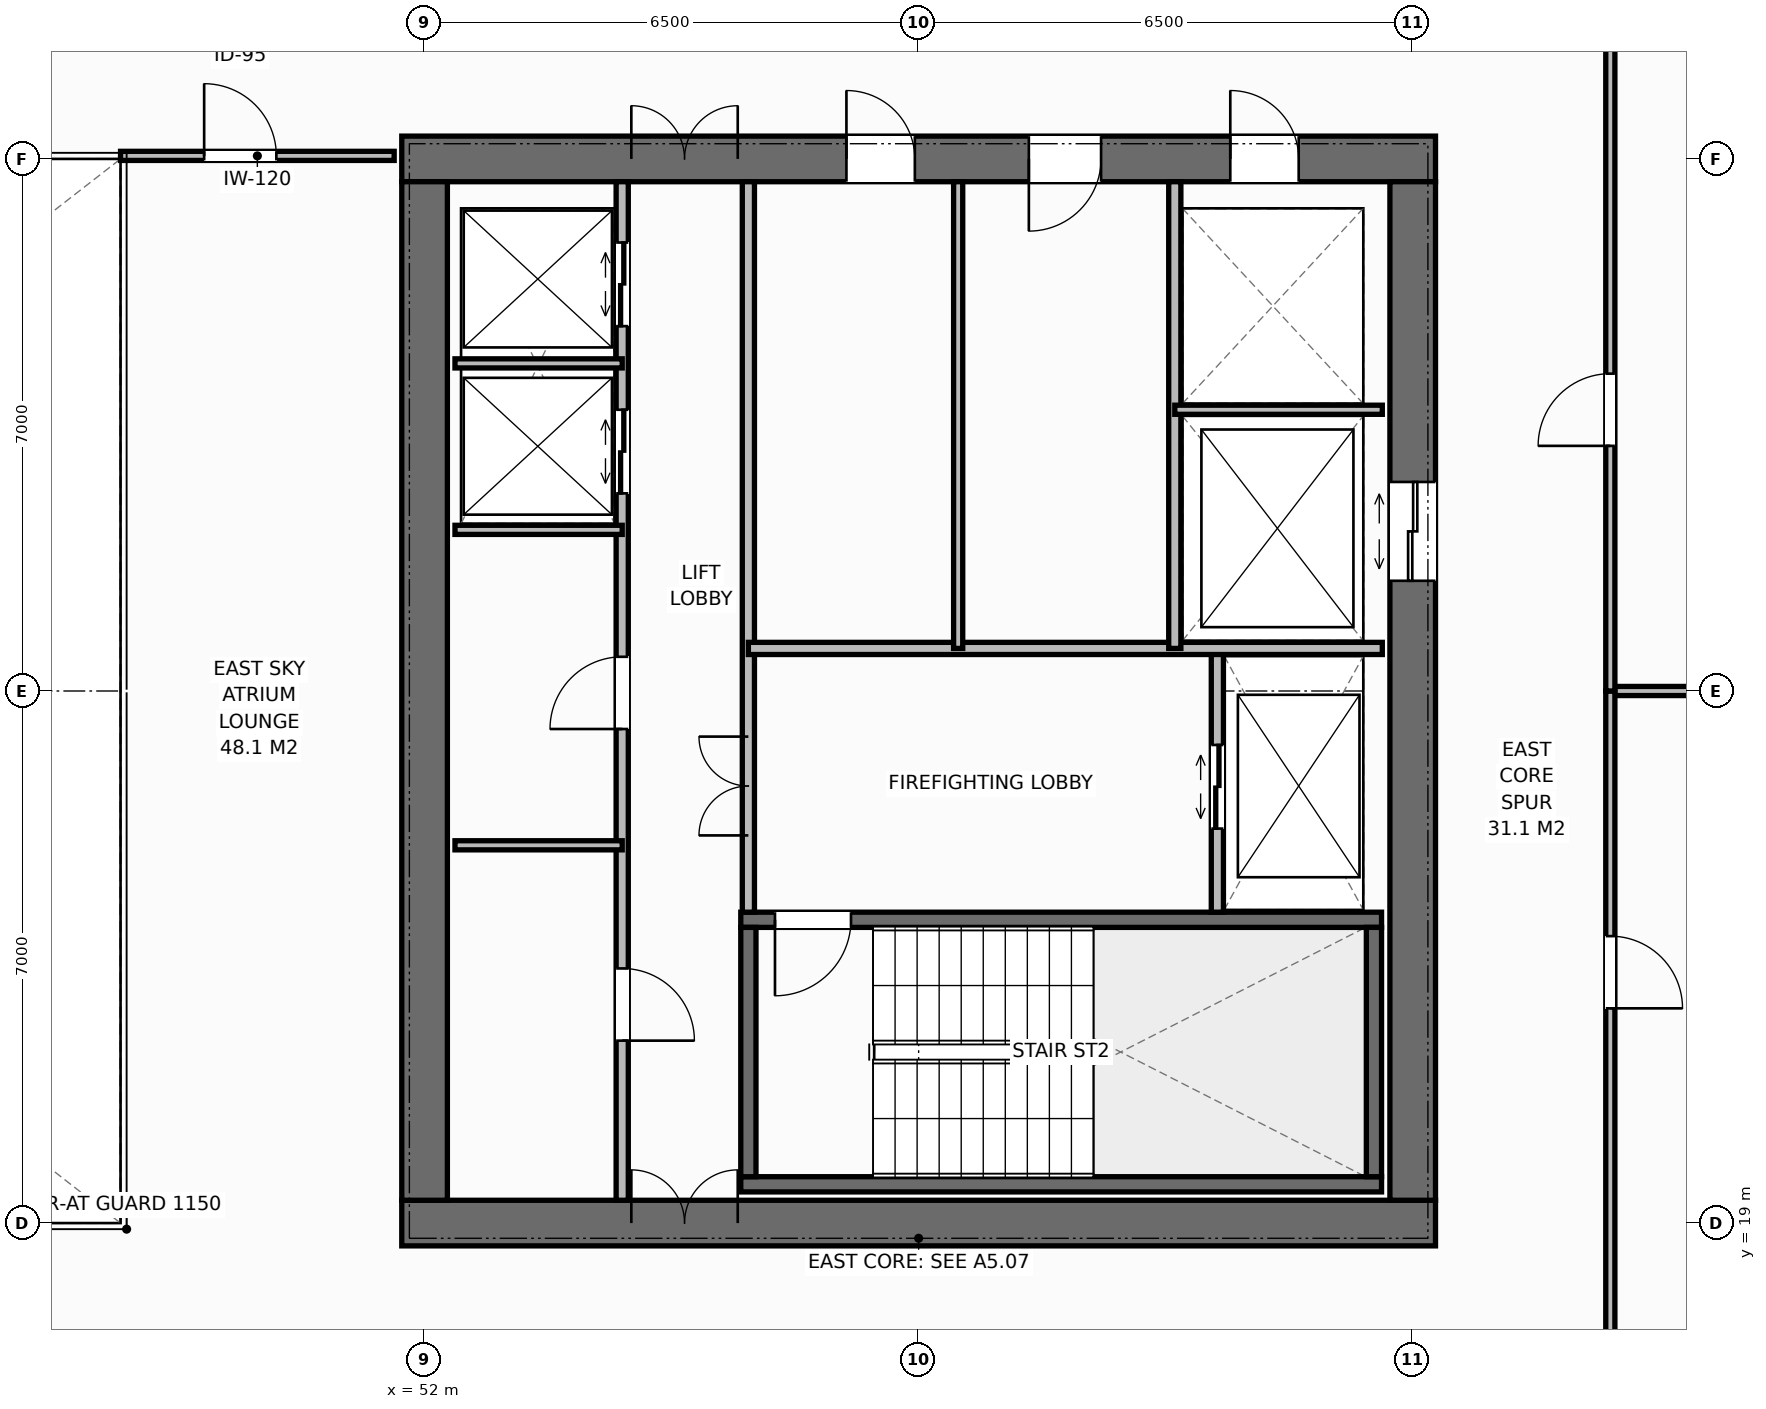
"""IFC4 building model, lengths in metres.
Left out: names, types, materials, properties, quantities, classifications, styles, units other than length and angle.
Written with IfcOpenShell. Run it as: python <this file> out.ifc"""

import sys

from ifc_helpers import new_model, si_unit, direction, frame, frame_2d, origin, place, context, subcontext, project, spatial, rectangle, extrude, element, fill, save


model = new_model("IFC4")
c1 = context("Model", 3, precision=1e-05, world=origin(), true_north=direction((0.0, 1.0)))
c2 = subcontext(c1, "Body", "Model", "MODEL_VIEW")
j1 = project(units=[si_unit("LENGTHUNIT", "METRE"), si_unit("PLANEANGLEUNIT", "RADIAN")], contexts=[c1])
p1 = place(None, origin())
s1 = spatial("IfcSite", under=j1, at=p1, CompositionType="ELEMENT")
p2 = place(p1, origin())
s2 = spatial("IfcBuilding", under=s1, at=p2, CompositionType="ELEMENT")
p3 = place(p2, frame((0.0, 0.0, 170.8)))
s3 = spatial("IfcBuildingStorey", under=s2, at=p3, CompositionType="ELEMENT", Elevation=170.8)
p4 = place(p3, frame((51.7, 19.0, 0.0), z_axis=(0.0, 0.0, 1.0), x_axis=(1.0, 0.0, 0.0)))
e1 = element("IfcWall", 1, at=p4, inside=s3, PredefinedType="SHEAR", context=c2, shape_type="SweptSolid", body=[
    extrude(rectangle(XDim=13.6, YDim=0.6, at=frame_2d((6.8, 0.0))), origin(), (0.0, 0.0, 1.0), 3.8),
])
p5 = place(p4, frame((3.02, 0.0, 0.0)))
e2 = element("IfcOpeningElement", 2, at=p5, cuts=e1, PredefinedType="OPENING", context=c2, shape_type="SweptSolid", body=[
    extrude(rectangle(XDim=1.4, YDim=2.2, at=frame_2d((0.7, 1.1))), frame((0.0, 0.31, 0.0), z_axis=(0.0, -1.0, 0.0), x_axis=(1.0, 0.0, 0.0)), (0.0, 0.0, 1.0), 0.62),
])
p6 = place(p3, frame((51.7, 33.0, 0.0), z_axis=(0.0, 0.0, 1.0), x_axis=(1.0, 0.0, 0.0)))
e3 = element("IfcWall", 3, at=p6, inside=s3, PredefinedType="SHEAR", context=c2, shape_type="SweptSolid", body=[
    extrude(rectangle(XDim=13.6, YDim=0.6, at=frame_2d((6.8, 0.0))), origin(), (0.0, 0.0, 1.0), 3.8),
])
p7 = place(p6, frame((3.02, 0.0, 0.0)))
e4 = element("IfcOpeningElement", 4, at=p7, cuts=e3, PredefinedType="OPENING", context=c2, shape_type="SweptSolid", body=[
    extrude(rectangle(XDim=1.4, YDim=2.2, at=frame_2d((0.7, 1.1))), frame((0.0, 0.31, 0.0), z_axis=(0.0, -1.0, 0.0), x_axis=(1.0, 0.0, 0.0)), (0.0, 0.0, 1.0), 0.62),
])
p8 = place(p6, frame((10.9, 0.0, 0.0)))
e5 = element("IfcOpeningElement", 5, at=p8, cuts=e3, PredefinedType="OPENING", context=c2, shape_type="SweptSolid", body=[
    extrude(rectangle(XDim=0.9, YDim=2.15, at=frame_2d((0.45, 1.075))), frame((0.0, 0.31, 0.0), z_axis=(0.0, -1.0, 0.0), x_axis=(1.0, 0.0, 0.0)), (0.0, 0.0, 1.0), 0.62),
])
p9 = place(p6, frame((5.85, 0.0, 0.0)))
e6 = element("IfcOpeningElement", 6, at=p9, cuts=e3, PredefinedType="OPENING", context=c2, shape_type="SweptSolid", body=[
    extrude(rectangle(XDim=0.9, YDim=2.15, at=frame_2d((0.45, 1.075))), frame((0.0, 0.31, 0.0), z_axis=(0.0, -1.0, 0.0), x_axis=(1.0, 0.0, 0.0)), (0.0, 0.0, 1.0), 0.62),
])
p10 = place(p6, frame((8.25, 0.0, 0.0)))
e7 = element("IfcOpeningElement", 7, at=p10, cuts=e3, PredefinedType="OPENING", context=c2, shape_type="SweptSolid", body=[
    extrude(rectangle(XDim=0.95, YDim=2.15, at=frame_2d((0.475, 1.075))), frame((0.0, 0.31, 0.0), z_axis=(0.0, -1.0, 0.0), x_axis=(1.0, 0.0, 0.0)), (0.0, 0.0, 1.0), 0.62),
])
p11 = place(p3, frame((52.0, 19.3, 0.0), z_axis=(0.0, 0.0, 1.0), x_axis=(0.0, 1.0, 0.0)))
e8 = element("IfcWall", 8, at=p11, inside=s3, PredefinedType="SHEAR", context=c2, shape_type="SweptSolid", body=[
    extrude(rectangle(XDim=13.4, YDim=0.6, at=frame_2d((6.7, 0.0))), origin(), (0.0, 0.0, 1.0), 3.8),
])
p12 = place(p3, frame((65.0, 19.3, 0.0), z_axis=(0.0, 0.0, 1.0), x_axis=(0.0, 1.0, 0.0)))
e9 = element("IfcWall", 9, at=p12, inside=s3, PredefinedType="SHEAR", context=c2, shape_type="SweptSolid", body=[
    extrude(rectangle(XDim=13.4, YDim=0.6, at=frame_2d((6.7, 0.0))), origin(), (0.0, 0.0, 1.0), 3.8),
])
p13 = place(p12, frame((8.15, 0.0, 0.0)))
e10 = element("IfcOpeningElement", 10, at=p13, cuts=e9, PredefinedType="OPENING", context=c2, shape_type="SweptSolid", body=[
    extrude(rectangle(XDim=1.3, YDim=2.2, at=frame_2d((0.65, 1.1))), frame((0.0, 0.31, 0.0), z_axis=(0.0, -1.0, 0.0), x_axis=(1.0, 0.0, 0.0)), (0.0, 0.0, 1.0), 0.62),
])
p14 = place(p3, frame((56.16, 19.51, 0.0), z_axis=(0.0, 0.0, 1.0), x_axis=(1.0, 0.0, 0.0)))
e11 = element("IfcWall", 11, at=p14, inside=s3, PredefinedType="SHEAR", context=c2, shape_type="SweptSolid", body=[
    extrude(rectangle(XDim=8.43, YDim=0.2, at=frame_2d((4.215, 0.0))), origin(), (0.0, 0.0, 1.0), 3.8),
])
p15 = place(p3, frame((56.16, 22.99, 0.0), z_axis=(0.0, 0.0, 1.0), x_axis=(1.0, 0.0, 0.0)))
e12 = element("IfcWall", 12, at=p15, inside=s3, PredefinedType="SHEAR", context=c2, shape_type="SweptSolid", body=[
    extrude(rectangle(XDim=8.43, YDim=0.2, at=frame_2d((4.215, 0.0))), origin(), (0.0, 0.0, 1.0), 3.8),
])
p16 = place(p15, frame((0.45, 0.0, 0.0)))
e13 = element("IfcOpeningElement", 13, at=p16, cuts=e12, PredefinedType="OPENING", context=c2, shape_type="SweptSolid", body=[
    extrude(rectangle(XDim=1.0, YDim=2.15, at=frame_2d((0.5, 1.075))), frame((0.0, 0.11, 0.0), z_axis=(0.0, -1.0, 0.0), x_axis=(1.0, 0.0, 0.0)), (0.0, 0.0, 1.0), 0.22),
])
for number, where, z_axis, x_axis in (
    (14, (56.26, 19.61, 0.0), (0.0, 0.0, 1.0), (0.0, 1.0, 0.0)),
    (15, (64.49, 19.61, 0.0), (0.0, 0.0, 1.0), (0.0, 1.0, 0.0)),
):
    element("IfcWall", number, at=place(p3, frame(where, z_axis=z_axis, x_axis=x_axis)), inside=s3, PredefinedType="SHEAR", context=c2, shape_type="SweptSolid", body=[
        extrude(rectangle(XDim=3.28, YDim=0.2, at=frame_2d((1.64, 0.0))), origin(), (0.0, 0.0, 1.0), 3.8),
    ])
p17 = place(p3, frame((54.6, 19.3, 0.0), z_axis=(0.0, 0.0, 1.0), x_axis=(0.0, 1.0, 0.0)))
e16 = element("IfcWall", 16, at=p17, inside=s3, PredefinedType="STANDARD", context=c2, shape_type="SweptSolid", body=[
    extrude(rectangle(XDim=13.4, YDim=0.16, at=frame_2d((6.7, 0.0))), origin(), (0.0, 0.0, 1.0), 3.572),
])
p18 = place(p17, frame((2.1, 0.0, 0.0)))
e17 = element("IfcOpeningElement", 17, at=p18, cuts=e16, PredefinedType="OPENING", context=c2, shape_type="SweptSolid", body=[
    extrude(rectangle(XDim=0.95, YDim=2.15, at=frame_2d((0.475, 1.075))), frame((0.0, 0.09, 0.0), z_axis=(0.0, -1.0, 0.0), x_axis=(1.0, 0.0, 0.0)), (0.0, 0.0, 1.0), 0.18),
])
p19 = place(p17, frame((6.2, 0.0, 0.0)))
e18 = element("IfcOpeningElement", 18, at=p19, cuts=e16, PredefinedType="OPENING", context=c2, shape_type="SweptSolid", body=[
    extrude(rectangle(XDim=0.95, YDim=2.15, at=frame_2d((0.475, 1.075))), frame((0.0, 0.09, 0.0), z_axis=(0.0, -1.0, 0.0), x_axis=(1.0, 0.0, 0.0)), (0.0, 0.0, 1.0), 0.18),
])
p20 = place(p17, frame((9.3, 0.0, 0.0)))
e19 = element("IfcOpeningElement", 19, at=p20, cuts=e16, PredefinedType="OPENING", context=c2, shape_type="SweptSolid", body=[
    extrude(rectangle(XDim=1.1, YDim=2.2, at=frame_2d((0.55, 1.1))), frame((0.0, 0.09, 0.0), z_axis=(0.0, -1.0, 0.0), x_axis=(1.0, 0.0, 0.0)), (0.0, 0.0, 1.0), 0.18),
])
p21 = place(p17, frame((11.5, 0.0, 0.0)))
e20 = element("IfcOpeningElement", 20, at=p21, cuts=e16, PredefinedType="OPENING", context=c2, shape_type="SweptSolid", body=[
    extrude(rectangle(XDim=1.1, YDim=2.2, at=frame_2d((0.55, 1.1))), frame((0.0, 0.09, 0.0), z_axis=(0.0, -1.0, 0.0), x_axis=(1.0, 0.0, 0.0)), (0.0, 0.0, 1.0), 0.18),
])
p22 = place(p3, frame((56.26, 23.09, 0.0), z_axis=(0.0, 0.0, 1.0), x_axis=(0.0, 1.0, 0.0)))
e21 = element("IfcWall", 21, at=p22, inside=s3, PredefinedType="STANDARD", context=c2, shape_type="SweptSolid", body=[
    extrude(rectangle(XDim=9.61, YDim=0.16, at=frame_2d((4.805, 0.0))), origin(), (0.0, 0.0, 1.0), 3.572),
])
p23 = place(p22, frame((1.01, 0.0, 0.0)))
e22 = element("IfcOpeningElement", 22, at=p23, cuts=e21, PredefinedType="OPENING", context=c2, shape_type="SweptSolid", body=[
    extrude(rectangle(XDim=1.3, YDim=2.2, at=frame_2d((0.65, 1.1))), frame((0.0, 0.09, 0.0), z_axis=(0.0, -1.0, 0.0), x_axis=(1.0, 0.0, 0.0)), (0.0, 0.0, 1.0), 0.18),
])
for number, where, z_axis, x_axis in (
    (23, (52.4, 23.97, 0.0), (0.0, 0.0, 1.0), (1.0, 0.0, 0.0)),
    (24, (52.4, 28.12, 0.0), (0.0, 0.0, 1.0), (1.0, 0.0, 0.0)),
    (25, (52.4, 30.31, 0.0), (0.0, 0.0, 1.0), (1.0, 0.0, 0.0)),
):
    element("IfcWall", number, at=place(p3, frame(where, z_axis=z_axis, x_axis=x_axis)), inside=s3, PredefinedType="PARTITIONING", context=c2, shape_type="SweptSolid", body=[
        extrude(rectangle(XDim=2.2, YDim=0.12, at=frame_2d((1.1, 0.0))), origin(), (0.0, 0.0, 1.0), 3.572),
    ])
p24 = place(p3, frame((62.43, 23.09, 0.0), z_axis=(0.0, 0.0, 1.0), x_axis=(0.0, 1.0, 0.0)))
e26 = element("IfcWall", 26, at=p24, inside=s3, PredefinedType="STANDARD", context=c2, shape_type="SweptSolid", body=[
    extrude(rectangle(XDim=3.47, YDim=0.16, at=frame_2d((1.735, 0.0))), origin(), (0.0, 0.0, 1.0), 3.572),
])
p25 = place(p24, frame((1.1, 0.0, 0.0)))
e27 = element("IfcOpeningElement", 27, at=p25, cuts=e26, PredefinedType="OPENING", context=c2, shape_type="SweptSolid", body=[
    extrude(rectangle(XDim=1.1, YDim=2.2, at=frame_2d((0.55, 1.1))), frame((0.0, 0.09, 0.0), z_axis=(0.0, -1.0, 0.0), x_axis=(1.0, 0.0, 0.0)), (0.0, 0.0, 1.0), 0.18),
])
p26 = place(p3, frame((56.26, 26.56, 0.0), z_axis=(0.0, 0.0, 1.0), x_axis=(1.0, 0.0, 0.0)))
e28 = element("IfcWall", 28, at=p26, inside=s3, PredefinedType="STANDARD", context=c2, shape_type="SweptSolid", body=[
    extrude(rectangle(XDim=8.34, YDim=0.16, at=frame_2d((4.17, 0.0))), origin(), (0.0, 0.0, 1.0), 3.572),
])
p27 = place(p3, frame((61.87, 26.56, 0.0), z_axis=(0.0, 0.0, 1.0), x_axis=(0.0, 1.0, 0.0)))
e29 = element("IfcWall", 29, at=p27, inside=s3, PredefinedType="STANDARD", context=c2, shape_type="SweptSolid", body=[
    extrude(rectangle(XDim=6.14, YDim=0.16, at=frame_2d((3.07, 0.0))), origin(), (0.0, 0.0, 1.0), 3.572),
])
p28 = place(p3, frame((61.87, 29.7, 0.0), z_axis=(0.0, 0.0, 1.0), x_axis=(1.0, 0.0, 0.0)))
e30 = element("IfcWall", 30, at=p28, inside=s3, PredefinedType="PARTITIONING", context=c2, shape_type="SweptSolid", body=[
    extrude(rectangle(XDim=2.73, YDim=0.12, at=frame_2d((1.365, 0.0))), origin(), (0.0, 0.0, 1.0), 3.572),
])
p29 = place(p3, frame((59.02, 26.56, 0.0), z_axis=(0.0, 0.0, 1.0), x_axis=(0.0, 1.0, 0.0)))
e31 = element("IfcWall", 31, at=p29, inside=s3, PredefinedType="PARTITIONING", context=c2, shape_type="SweptSolid", body=[
    extrude(rectangle(XDim=6.14, YDim=0.12, at=frame_2d((3.07, 0.0))), origin(), (0.0, 0.0, 1.0), 3.572),
])
p30 = place(p3, frame((48.0, 33.04, 0.0), z_axis=(0.0, 0.0, 1.0), x_axis=(1.0, 0.0, 0.0)))
e32 = element("IfcWall", 32, at=p30, inside=s3, PredefinedType="PARTITIONING", context=c2, shape_type="SweptSolid", body=[
    extrude(rectangle(XDim=3.6, YDim=0.12, at=frame_2d((1.8, 0.0))), origin(), (0.0, 0.0, 1.0), 3.312),
])
p31 = place(p30, frame((1.1, 0.0, 0.0)))
e33 = element("IfcOpeningElement", 33, at=p31, cuts=e32, PredefinedType="OPENING", context=c2, shape_type="SweptSolid", body=[
    extrude(rectangle(XDim=0.95, YDim=2.15, at=frame_2d((0.475, 1.075))), frame((0.0, 0.07, 0.0), z_axis=(0.0, -1.0, 0.0), x_axis=(1.0, 0.0, 0.0)), (0.0, 0.0, 1.0), 0.14),
])
p32 = place(p3, frame((67.6, 26.0, 0.0), z_axis=(0.0, 0.0, 1.0), x_axis=(1.0, 0.0, 0.0)))
e34 = element("IfcWall", 34, at=p32, inside=s3, PredefinedType="PARTITIONING", context=c2, shape_type="SweptSolid", body=[
    extrude(rectangle(XDim=6.58, YDim=0.12, at=frame_2d((3.29, 0.0))), origin(), (0.0, 0.0, 1.0), 3.572),
])
p33 = place(p3, frame((67.6, 16.5, 0.0), z_axis=(0.0, 0.0, 1.0), x_axis=(0.0, 1.0, 0.0)))
e35 = element("IfcWall", 35, at=p33, inside=s3, PredefinedType="PARTITIONING", context=c2, shape_type="SweptSolid", body=[
    extrude(rectangle(XDim=9.5, YDim=0.12, at=frame_2d((4.75, 0.0))), origin(), (0.0, 0.0, 1.0), 3.572),
])
p34 = place(p33, frame((5.325, 0.0, 0.0)))
e36 = element("IfcOpeningElement", 36, at=p34, cuts=e35, PredefinedType="OPENING", context=c2, shape_type="SweptSolid", body=[
    extrude(rectangle(XDim=0.95, YDim=2.15, at=frame_2d((0.475, 1.075))), frame((0.0, 0.07, 0.0), z_axis=(0.0, -1.0, 0.0), x_axis=(1.0, 0.0, 0.0)), (0.0, 0.0, 1.0), 0.14),
])
p35 = place(p3, frame((67.6, 26.0, 0.0), z_axis=(0.0, 0.0, 1.0), x_axis=(0.0, 1.0, 0.0)))
e37 = element("IfcWall", 37, at=p35, inside=s3, PredefinedType="PARTITIONING", context=c2, shape_type="SweptSolid", body=[
    extrude(rectangle(XDim=9.5, YDim=0.12, at=frame_2d((4.75, 0.0))), origin(), (0.0, 0.0, 1.0), 3.572),
])
p36 = place(p35, frame((3.225, 0.0, 0.0)))
e38 = element("IfcOpeningElement", 38, at=p36, cuts=e37, PredefinedType="OPENING", context=c2, shape_type="SweptSolid", body=[
    extrude(rectangle(XDim=0.95, YDim=2.15, at=frame_2d((0.475, 1.075))), frame((0.0, 0.07, 0.0), z_axis=(0.0, -1.0, 0.0), x_axis=(1.0, 0.0, 0.0)), (0.0, 0.0, 1.0), 0.14),
])
p37 = place(p5, origin())
e39 = element("IfcDoor", 39, at=p37, inside=s3, OperationType="DOUBLE_DOOR_SINGLE_SWING", PredefinedType="DOOR", context=c2, shape_type="SweptSolid", body=[
    extrude(rectangle(XDim=1.4, YDim=2.2, at=frame_2d((0.7, 1.1))), frame((0.0, 0.075, 0.0), z_axis=(0.0, -1.0, 0.0), x_axis=(1.0, 0.0, 0.0)), (0.0, 0.0, 1.0), 0.05),
])
fill(e2, e39)
p38 = place(p7, origin())
e40 = element("IfcDoor", 40, at=p38, inside=s3, OperationType="DOUBLE_DOOR_SINGLE_SWING", PredefinedType="DOOR", context=c2, shape_type="SweptSolid", body=[
    extrude(rectangle(XDim=1.4, YDim=2.2, at=frame_2d((0.7, 1.1))), frame((0.0, -0.025, 0.0), z_axis=(0.0, -1.0, 0.0), x_axis=(1.0, 0.0, 0.0)), (0.0, 0.0, 1.0), 0.05),
])
fill(e4, e40)
p39 = place(p18, origin())
e41 = element("IfcDoor", 41, at=p39, inside=s3, OperationType="SINGLE_SWING_RIGHT", PredefinedType="DOOR", context=c2, shape_type="SweptSolid", body=[
    extrude(rectangle(XDim=0.95, YDim=2.15, at=frame_2d((0.475, 1.075))), frame((0.0, 0.025, 0.0), z_axis=(0.0, -1.0, 0.0), x_axis=(1.0, 0.0, 0.0)), (0.0, 0.0, 1.0), 0.05),
])
fill(e17, e41)
p40 = place(p19, origin())
e42 = element("IfcDoor", 42, at=p40, inside=s3, OperationType="SINGLE_SWING_LEFT", PredefinedType="DOOR", context=c2, shape_type="SweptSolid", body=[
    extrude(rectangle(XDim=0.95, YDim=2.15, at=frame_2d((0.475, 1.075))), frame((0.0, 0.025, 0.0), z_axis=(0.0, -1.0, 0.0), x_axis=(1.0, 0.0, 0.0)), (0.0, 0.0, 1.0), 0.05),
])
fill(e18, e42)
p41 = place(p20, origin())
e43 = element("IfcDoor", 43, at=p41, inside=s3, OperationType="DOUBLE_DOOR_SLIDING", PredefinedType="DOOR", context=c2, shape_type="SweptSolid", body=[
    extrude(rectangle(XDim=1.1, YDim=2.2, at=frame_2d((0.55, 1.1))), frame((0.0, 0.025, 0.0), z_axis=(0.0, -1.0, 0.0), x_axis=(1.0, 0.0, 0.0)), (0.0, 0.0, 1.0), 0.05),
])
fill(e19, e43)
p42 = place(p21, origin())
e44 = element("IfcDoor", 44, at=p42, inside=s3, OperationType="DOUBLE_DOOR_SLIDING", PredefinedType="DOOR", context=c2, shape_type="SweptSolid", body=[
    extrude(rectangle(XDim=1.1, YDim=2.2, at=frame_2d((0.55, 1.1))), frame((0.0, 0.025, 0.0), z_axis=(0.0, -1.0, 0.0), x_axis=(1.0, 0.0, 0.0)), (0.0, 0.0, 1.0), 0.05),
])
fill(e20, e44)
p43 = place(p16, origin())
e45 = element("IfcDoor", 45, at=p43, inside=s3, OperationType="SINGLE_SWING_RIGHT", PredefinedType="DOOR", context=c2, shape_type="SweptSolid", body=[
    extrude(rectangle(XDim=1.0, YDim=2.15, at=frame_2d((0.5, 1.075))), frame((0.0, 0.025, 0.0), z_axis=(0.0, -1.0, 0.0), x_axis=(1.0, 0.0, 0.0)), (0.0, 0.0, 1.0), 0.05),
])
fill(e13, e45)
p44 = place(p25, origin())
e46 = element("IfcDoor", 46, at=p44, inside=s3, OperationType="DOUBLE_DOOR_SLIDING", PredefinedType="DOOR", context=c2, shape_type="SweptSolid", body=[
    extrude(rectangle(XDim=1.1, YDim=2.2, at=frame_2d((0.55, 1.1))), frame((0.0, 0.025, 0.0), z_axis=(0.0, -1.0, 0.0), x_axis=(1.0, 0.0, 0.0)), (0.0, 0.0, 1.0), 0.05),
])
fill(e27, e46)
p45 = place(p23, origin())
e47 = element("IfcDoor", 47, at=p45, inside=s3, OperationType="DOUBLE_DOOR_SINGLE_SWING", PredefinedType="DOOR", context=c2, shape_type="SweptSolid", body=[
    extrude(rectangle(XDim=1.3, YDim=2.2, at=frame_2d((0.65, 1.1))), frame((0.0, 0.025, 0.0), z_axis=(0.0, -1.0, 0.0), x_axis=(1.0, 0.0, 0.0)), (0.0, 0.0, 1.0), 0.05),
])
fill(e22, e47)
p46 = place(p13, origin())
e48 = element("IfcDoor", 48, at=p46, inside=s3, OperationType="DOUBLE_DOOR_SLIDING", PredefinedType="DOOR", context=c2, shape_type="SweptSolid", body=[
    extrude(rectangle(XDim=1.3, YDim=2.2, at=frame_2d((0.65, 1.1))), frame((0.0, 0.025, 0.0), z_axis=(0.0, -1.0, 0.0), x_axis=(1.0, 0.0, 0.0)), (0.0, 0.0, 1.0), 0.05),
])
fill(e10, e48)
p47 = place(p8, origin())
e49 = element("IfcDoor", 49, at=p47, inside=s3, OperationType="SINGLE_SWING_LEFT", PredefinedType="DOOR", context=c2, shape_type="SweptSolid", body=[
    extrude(rectangle(XDim=0.9, YDim=2.15, at=frame_2d((0.45, 1.075))), frame((0.0, -0.025, 0.0), z_axis=(0.0, -1.0, 0.0), x_axis=(1.0, 0.0, 0.0)), (0.0, 0.0, 1.0), 0.05),
])
fill(e5, e49)
p48 = place(p9, origin())
e50 = element("IfcDoor", 50, at=p48, inside=s3, OperationType="SINGLE_SWING_LEFT", PredefinedType="DOOR", context=c2, shape_type="SweptSolid", body=[
    extrude(rectangle(XDim=0.9, YDim=2.15, at=frame_2d((0.45, 1.075))), frame((0.0, -0.025, 0.0), z_axis=(0.0, -1.0, 0.0), x_axis=(1.0, 0.0, 0.0)), (0.0, 0.0, 1.0), 0.05),
])
fill(e6, e50)
p49 = place(p10, origin())
e51 = element("IfcDoor", 51, at=p49, inside=s3, OperationType="SINGLE_SWING_RIGHT", PredefinedType="DOOR", context=c2, shape_type="SweptSolid", body=[
    extrude(rectangle(XDim=0.95, YDim=2.15, at=frame_2d((0.475, 1.075))), frame((0.0, -0.025, 0.0), z_axis=(0.0, -1.0, 0.0), x_axis=(1.0, 0.0, 0.0)), (0.0, 0.0, 1.0), 0.05),
])
fill(e7, e51)
p50 = place(p31, origin())
e52 = element("IfcDoor", 52, at=p50, inside=s3, OperationType="SINGLE_SWING_LEFT", PredefinedType="DOOR", context=c2, shape_type="SweptSolid", body=[
    extrude(rectangle(XDim=0.95, YDim=2.15, at=frame_2d((0.475, 1.075))), frame((0.0, 0.025, 0.0), z_axis=(0.0, -1.0, 0.0), x_axis=(1.0, 0.0, 0.0)), (0.0, 0.0, 1.0), 0.05),
])
fill(e33, e52)
p51 = place(p34, origin())
e53 = element("IfcDoor", 53, at=p51, inside=s3, OperationType="SINGLE_SWING_RIGHT", PredefinedType="DOOR", context=c2, shape_type="SweptSolid", body=[
    extrude(rectangle(XDim=0.95, YDim=2.15, at=frame_2d((0.475, 1.075))), frame((0.0, 0.025, 0.0), z_axis=(0.0, -1.0, 0.0), x_axis=(1.0, 0.0, 0.0)), (0.0, 0.0, 1.0), 0.05),
])
fill(e36, e53)
p52 = place(p36, origin())
e54 = element("IfcDoor", 54, at=p52, inside=s3, OperationType="SINGLE_SWING_LEFT", PredefinedType="DOOR", context=c2, shape_type="SweptSolid", body=[
    extrude(rectangle(XDim=0.95, YDim=2.15, at=frame_2d((0.475, 1.075))), frame((0.0, 0.025, 0.0), z_axis=(0.0, -1.0, 0.0), x_axis=(1.0, 0.0, 0.0)), (0.0, 0.0, 1.0), 0.05),
])
fill(e38, e54)
save(model, sys.argv[1])
